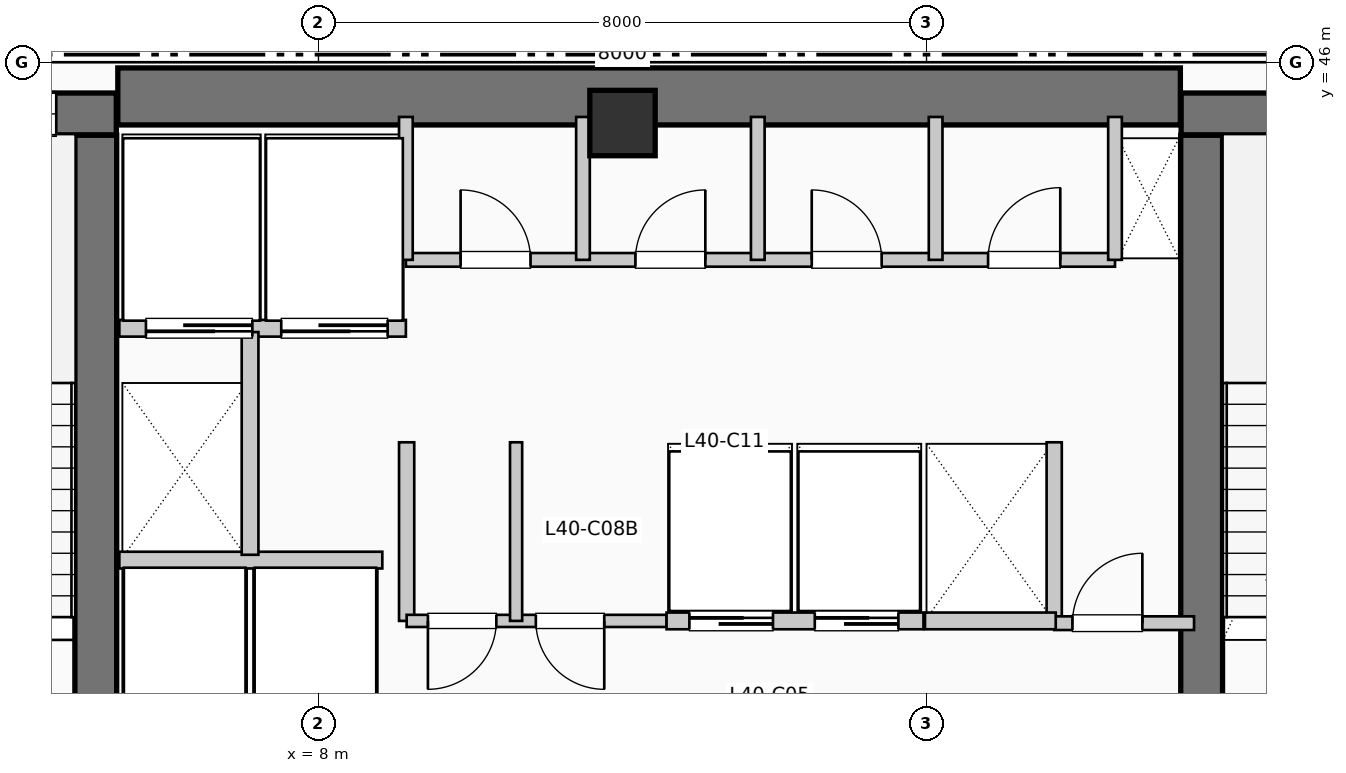
"""IFC4 building model, lengths in metres.
Left out: names, types, materials, properties, quantities, classifications, styles, units other than length and angle.
Written with IfcOpenShell. Run it as: python <this file> out.ifc"""

import sys

from ifc_helpers import new_model, si_unit, direction, frame, frame_2d, origin, origin_2d, place, context, subcontext, project, spatial, rectangle, extrude, element, fill, save


model = new_model("IFC4")
c1 = context("Model", 3, precision=1e-05, world=origin(), true_north=direction((0.0, 1.0)))
c2 = subcontext(c1, "Body", "Model", "MODEL_VIEW")
j1 = project(units=[si_unit("LENGTHUNIT", "METRE"), si_unit("PLANEANGLEUNIT", "RADIAN")], contexts=[c1])
p1 = place(None, origin())
s1 = spatial("IfcSite", under=j1, at=p1, CompositionType="ELEMENT")
p2 = place(p1, origin())
s2 = spatial("IfcBuilding", under=s1, at=p2, CompositionType="ELEMENT")
p3 = place(p2, frame((0.0, 0.0, 166.65)))
s3 = spatial("IfcBuildingStorey", under=s2, at=p3, CompositionType="ELEMENT", Elevation=166.65)
p4 = place(p3, frame((5.36, 45.55, 0.0), z_axis=(0.0, 0.0, 1.0), x_axis=(1.0, 0.0, 0.0)))
e1 = element("IfcWall", 1, at=p4, inside=s3, PredefinedType="SHEAR", context=c2, shape_type="SweptSolid", body=[
    extrude(rectangle(XDim=13.98, YDim=0.75, at=frame_2d((6.99, 0.0))), origin(), (0.0, 0.0, 1.0), 3.96),
])
p5 = place(p3, frame((5.07, 37.15, 0.0), z_axis=(0.0, 0.0, 1.0), x_axis=(0.0, 1.0, 0.0)))
e2 = element("IfcWall", 2, at=p5, inside=s3, PredefinedType="SHEAR", context=c2, shape_type="SweptSolid", body=[
    extrude(rectangle(XDim=7.89, YDim=0.55, at=frame_2d((3.945, 0.0))), origin(), (0.0, 0.0, 1.0), 3.96),
])
p6 = place(p3, frame((1.1, 45.32, 0.0), z_axis=(0.0, 0.0, 1.0), x_axis=(1.0, 0.0, 0.0)))
e3 = element("IfcWall", 3, at=p6, inside=s3, PredefinedType="SHEAR", context=c2, shape_type="SweptSolid", body=[
    extrude(rectangle(XDim=4.24, YDim=0.55, at=frame_2d((2.12, 0.0))), origin(), (0.0, 0.0, 1.0), 3.96),
])
p7 = place(p6, frame((2.05, 0.0, 1.05)))
e4 = element("IfcOpeningElement", 4, at=p7, cuts=e3, PredefinedType="OPENING", context=c2, shape_type="SweptSolid", body=[
    extrude(rectangle(XDim=1.4, YDim=1.8, at=frame_2d((0.7, 0.9))), frame((0.0, 0.285, 0.0), z_axis=(0.0, -1.0, 0.0), x_axis=(1.0, 0.0, 0.0)), (0.0, 0.0, 1.0), 0.57),
])
p8 = place(p3, frame((19.62, 37.15, 0.0), z_axis=(0.0, 0.0, 1.0), x_axis=(0.0, 1.0, 0.0)))
e5 = element("IfcWall", 5, at=p8, inside=s3, PredefinedType="SHEAR", context=c2, shape_type="SweptSolid", body=[
    extrude(rectangle(XDim=7.89, YDim=0.55, at=frame_2d((3.945, 0.0))), origin(), (0.0, 0.0, 1.0), 3.96),
])
p9 = place(p3, frame((19.35, 45.32, 0.0), z_axis=(0.0, 0.0, 1.0), x_axis=(1.0, 0.0, 0.0)))
e6 = element("IfcWall", 6, at=p9, inside=s3, PredefinedType="SHEAR", context=c2, shape_type="SweptSolid", body=[
    extrude(rectangle(XDim=3.69, YDim=0.55, at=frame_2d((1.845, 0.0))), origin(), (0.0, 0.0, 1.0), 3.96),
])
p10 = place(p9, frame((1.15, 0.0, 1.05)))
e7 = element("IfcOpeningElement", 7, at=p10, cuts=e6, PredefinedType="OPENING", context=c2, shape_type="SweptSolid", body=[
    extrude(rectangle(XDim=1.4, YDim=1.8, at=frame_2d((0.7, 0.9))), frame((0.0, 0.285, 0.0), z_axis=(0.0, -1.0, 0.0), x_axis=(1.0, 0.0, 0.0)), (0.0, 0.0, 1.0), 0.57),
])
p11 = place(p3, frame((12.0, 45.2, 0.0), z_axis=(0.0, 0.0, 1.0), x_axis=(1.0, 0.0, 0.0)))
e8 = element("IfcColumn", 8, at=p11, inside=s3, PredefinedType="COLUMN", context=c2, shape_type="SweptSolid", body=[
    extrude(rectangle(XDim=0.86, YDim=0.86, at=origin_2d()), origin(), (0.0, 0.0, 1.0), 3.96),
])
p12 = place(p3, frame((5.38, 39.45, 0.0), z_axis=(0.0, 0.0, 1.0), x_axis=(1.0, 0.0, 0.0)))
e9 = element("IfcWall", 9, at=p12, inside=s3, PredefinedType="PARTITIONING", context=c2, shape_type="SweptSolid", body=[
    extrude(rectangle(XDim=3.46, YDim=0.22, at=frame_2d((1.73, 0.0))), origin(), (0.0, 0.0, 1.0), 3.71),
])
p13 = place(p3, frame((5.38, 42.5, 0.0), z_axis=(0.0, 0.0, 1.0), x_axis=(1.0, 0.0, 0.0)))
e10 = element("IfcWall", 10, at=p13, inside=s3, PredefinedType="PARTITIONING", context=c2, shape_type="SweptSolid", body=[
    extrude(rectangle(XDim=3.77, YDim=0.22, at=frame_2d((1.885, 0.0))), origin(), (0.0, 0.0, 1.0), 3.71),
])
p14 = place(p13, frame((1.75, 0.0, 0.0), z_axis=(0.0, 0.0, 1.0), x_axis=(-1.0, 0.0, 0.0)))
e11 = element("IfcOpeningElement", 11, at=p14, cuts=e10, PredefinedType="OPENING", context=c2, shape_type="SweptSolid", body=[
    extrude(rectangle(XDim=1.4, YDim=2.2, at=frame_2d((0.7, 1.1))), frame((0.0, 0.12, 0.0), z_axis=(0.0, -1.0, 0.0), x_axis=(1.0, 0.0, 0.0)), (0.0, 0.0, 1.0), 0.24),
])
p15 = place(p13, frame((3.53, 0.0, 0.0), z_axis=(0.0, 0.0, 1.0), x_axis=(-1.0, 0.0, 0.0)))
e12 = element("IfcOpeningElement", 12, at=p15, cuts=e10, PredefinedType="OPENING", context=c2, shape_type="SweptSolid", body=[
    extrude(rectangle(XDim=1.4, YDim=2.2, at=frame_2d((0.7, 1.1))), frame((0.0, 0.12, 0.0), z_axis=(0.0, -1.0, 0.0), x_axis=(1.0, 0.0, 0.0)), (0.0, 0.0, 1.0), 0.24),
])
p16 = place(p3, frame((7.1, 39.52, 0.0), z_axis=(0.0, 0.0, 1.0), x_axis=(0.0, 1.0, 0.0)))
e13 = element("IfcWall", 13, at=p16, inside=s3, PredefinedType="PARTITIONING", context=c2, shape_type="SweptSolid", body=[
    extrude(rectangle(XDim=2.93, YDim=0.22, at=frame_2d((1.465, 0.0))), origin(), (0.0, 0.0, 1.0), 3.71),
])
for number, where, z_axis, x_axis in (
    (14, (9.16, 38.65, 0.0), (0.0, 0.0, 1.0), (0.0, 1.0, 0.0)),
    (15, (17.68, 38.65, 0.0), (0.0, 0.0, 1.0), (0.0, 1.0, 0.0)),
):
    element("IfcWall", number, at=place(p3, frame(where, z_axis=z_axis, x_axis=x_axis)), inside=s3, PredefinedType="PARTITIONING", context=c2, shape_type="SweptSolid", body=[
        extrude(rectangle(XDim=2.35, YDim=0.2, at=frame_2d((1.175, 0.0))), origin(), (0.0, 0.0, 1.0), 3.71),
    ])
p17 = place(p3, frame((17.68, 38.62, 0.0), z_axis=(0.0, 0.0, 1.0), x_axis=(1.0, 0.0, 0.0)))
e16 = element("IfcWall", 16, at=p17, inside=s3, PredefinedType="PARTITIONING", context=c2, shape_type="SweptSolid", body=[
    extrude(rectangle(XDim=1.84, YDim=0.18, at=frame_2d((0.92, 0.0))), origin(), (0.0, 0.0, 1.0), 3.71),
])
p18 = place(p17, frame((0.24, 0.0, 0.0)))
e17 = element("IfcOpeningElement", 17, at=p18, cuts=e16, PredefinedType="OPENING", context=c2, shape_type="SweptSolid", body=[
    extrude(rectangle(XDim=0.92, YDim=2.1, at=frame_2d((0.46, 1.05))), frame((0.0, 0.1, 0.0), z_axis=(0.0, -1.0, 0.0), x_axis=(1.0, 0.0, 0.0)), (0.0, 0.0, 1.0), 0.2),
])
p19 = place(p3, frame((9.16, 38.65, 0.0), z_axis=(0.0, 0.0, 1.0), x_axis=(1.0, 0.0, 0.0)))
e18 = element("IfcWall", 18, at=p19, inside=s3, PredefinedType="PARTITIONING", context=c2, shape_type="SweptSolid", body=[
    extrude(rectangle(XDim=3.42, YDim=0.16, at=frame_2d((1.71, 0.0))), origin(), (0.0, 0.0, 1.0), 3.71),
])
p20 = place(p19, frame((1.18, 0.0, 0.0), z_axis=(0.0, 0.0, 1.0), x_axis=(-1.0, 0.0, 0.0)))
e19 = element("IfcOpeningElement", 19, at=p20, cuts=e18, PredefinedType="OPENING", context=c2, shape_type="SweptSolid", body=[
    extrude(rectangle(XDim=0.9, YDim=2.15, at=frame_2d((0.45, 1.075))), frame((0.0, 0.09, 0.0), z_axis=(0.0, -1.0, 0.0), x_axis=(1.0, 0.0, 0.0)), (0.0, 0.0, 1.0), 0.18),
])
p21 = place(p19, frame((2.6, 0.0, 0.0), z_axis=(0.0, 0.0, 1.0), x_axis=(-1.0, 0.0, 0.0)))
e20 = element("IfcOpeningElement", 20, at=p21, cuts=e18, PredefinedType="OPENING", context=c2, shape_type="SweptSolid", body=[
    extrude(rectangle(XDim=0.9, YDim=2.15, at=frame_2d((0.45, 1.075))), frame((0.0, 0.09, 0.0), z_axis=(0.0, -1.0, 0.0), x_axis=(1.0, 0.0, 0.0)), (0.0, 0.0, 1.0), 0.18),
])
p22 = place(p3, frame((10.6, 38.65, 0.0), z_axis=(0.0, 0.0, 1.0), x_axis=(0.0, 1.0, 0.0)))
e21 = element("IfcWall", 21, at=p22, inside=s3, PredefinedType="PARTITIONING", context=c2, shape_type="SweptSolid", body=[
    extrude(rectangle(XDim=2.35, YDim=0.16, at=frame_2d((1.175, 0.0))), origin(), (0.0, 0.0, 1.0), 3.71),
])
p23 = place(p3, frame((12.58, 38.65, 0.0), z_axis=(0.0, 0.0, 1.0), x_axis=(1.0, 0.0, 0.0)))
e22 = element("IfcWall", 22, at=p23, inside=s3, PredefinedType="PARTITIONING", context=c2, shape_type="SweptSolid", body=[
    extrude(rectangle(XDim=3.38, YDim=0.22, at=frame_2d((1.69, 0.0))), origin(), (0.0, 0.0, 1.0), 3.71),
])
p24 = place(p23, frame((0.3, 0.0, 0.0)))
e23 = element("IfcOpeningElement", 23, at=p24, cuts=e22, PredefinedType="OPENING", context=c2, shape_type="SweptSolid", body=[
    extrude(rectangle(XDim=1.1, YDim=2.2, at=frame_2d((0.55, 1.1))), frame((0.0, 0.12, 0.0), z_axis=(0.0, -1.0, 0.0), x_axis=(1.0, 0.0, 0.0)), (0.0, 0.0, 1.0), 0.24),
])
p25 = place(p23, frame((1.95, 0.0, 0.0)))
e24 = element("IfcOpeningElement", 24, at=p25, cuts=e22, PredefinedType="OPENING", context=c2, shape_type="SweptSolid", body=[
    extrude(rectangle(XDim=1.1, YDim=2.2, at=frame_2d((0.55, 1.1))), frame((0.0, 0.12, 0.0), z_axis=(0.0, -1.0, 0.0), x_axis=(1.0, 0.0, 0.0)), (0.0, 0.0, 1.0), 0.24),
])
p26 = place(p3, frame((15.98, 38.65, 0.0), z_axis=(0.0, 0.0, 1.0), x_axis=(1.0, 0.0, 0.0)))
e25 = element("IfcWall", 25, at=p26, inside=s3, PredefinedType="PARTITIONING", context=c2, shape_type="SweptSolid", body=[
    extrude(rectangle(XDim=1.72, YDim=0.22, at=frame_2d((0.86, 0.0))), origin(), (0.0, 0.0, 1.0), 3.71),
])
p27 = place(p3, frame((9.15, 43.4, 0.0), z_axis=(0.0, 0.0, 1.0), x_axis=(1.0, 0.0, 0.0)))
e26 = element("IfcWall", 26, at=p27, inside=s3, PredefinedType="PLUMBINGWALL", context=c2, shape_type="SweptSolid", body=[
    extrude(rectangle(XDim=9.33, YDim=0.18, at=frame_2d((4.665, 0.0))), origin(), (0.0, 0.0, 1.0), 3.71),
])
p28 = place(p27, frame((0.72, 0.0, 0.0)))
e27 = element("IfcOpeningElement", 27, at=p28, cuts=e26, PredefinedType="OPENING", context=c2, shape_type="SweptSolid", body=[
    extrude(rectangle(XDim=0.92, YDim=2.1, at=frame_2d((0.46, 1.05))), frame((0.0, 0.1, 0.0), z_axis=(0.0, -1.0, 0.0), x_axis=(1.0, 0.0, 0.0)), (0.0, 0.0, 1.0), 0.2),
])
p29 = place(p27, frame((3.02, 0.0, 0.0)))
e28 = element("IfcOpeningElement", 28, at=p29, cuts=e26, PredefinedType="OPENING", context=c2, shape_type="SweptSolid", body=[
    extrude(rectangle(XDim=0.92, YDim=2.1, at=frame_2d((0.46, 1.05))), frame((0.0, 0.1, 0.0), z_axis=(0.0, -1.0, 0.0), x_axis=(1.0, 0.0, 0.0)), (0.0, 0.0, 1.0), 0.2),
])
p30 = place(p27, frame((5.34, 0.0, 0.0)))
e29 = element("IfcOpeningElement", 29, at=p30, cuts=e26, PredefinedType="OPENING", context=c2, shape_type="SweptSolid", body=[
    extrude(rectangle(XDim=0.92, YDim=2.1, at=frame_2d((0.46, 1.05))), frame((0.0, 0.1, 0.0), z_axis=(0.0, -1.0, 0.0), x_axis=(1.0, 0.0, 0.0)), (0.0, 0.0, 1.0), 0.2),
])
p31 = place(p27, frame((7.66, 0.0, 0.0)))
e30 = element("IfcOpeningElement", 30, at=p31, cuts=e26, PredefinedType="OPENING", context=c2, shape_type="SweptSolid", body=[
    extrude(rectangle(XDim=0.95, YDim=2.1, at=frame_2d((0.475, 1.05))), frame((0.0, 0.1, 0.0), z_axis=(0.0, -1.0, 0.0), x_axis=(1.0, 0.0, 0.0)), (0.0, 0.0, 1.0), 0.2),
])
for number, where, z_axis, x_axis in (
    (31, (9.15, 43.4, 0.0), (0.0, 0.0, 1.0), (0.0, 1.0, 0.0)),
    (32, (18.48, 43.4, 0.0), (0.0, 0.0, 1.0), (0.0, 1.0, 0.0)),
    (33, (11.48, 43.4, 0.0), (0.0, 0.0, 1.0), (0.0, 1.0, 0.0)),
    (34, (13.78, 43.4, 0.0), (0.0, 0.0, 1.0), (0.0, 1.0, 0.0)),
    (35, (16.12, 43.4, 0.0), (0.0, 0.0, 1.0), (0.0, 1.0, 0.0)),
):
    element("IfcWall", number, at=place(p3, frame(where, z_axis=z_axis, x_axis=x_axis)), inside=s3, PredefinedType="PLUMBINGWALL", context=c2, shape_type="SweptSolid", body=[
        extrude(rectangle(XDim=1.88, YDim=0.18, at=frame_2d((0.94, 0.0))), origin(), (0.0, 0.0, 1.0), 3.71),
    ])
p32 = place(p7, origin())
e36 = element("IfcWindow", 36, at=p32, inside=s3, PartitioningType="SINGLE_PANEL", PredefinedType="WINDOW", context=c2, shape_type="SweptSolid", body=[
    extrude(rectangle(XDim=1.4, YDim=1.8, at=frame_2d((0.7, 0.9))), frame((0.0, 0.03, 0.0), z_axis=(0.0, -1.0, 0.0), x_axis=(1.0, 0.0, 0.0)), (0.0, 0.0, 1.0), 0.06),
])
fill(e4, e36)
p33 = place(p14, origin())
e37 = element("IfcDoor", 37, at=p33, inside=s3, OperationType="SLIDING_TO_LEFT", PredefinedType="DOOR", context=c2, shape_type="SweptSolid", body=[
    extrude(rectangle(XDim=1.4, YDim=2.2, at=frame_2d((0.7, 1.1))), frame((0.0, 0.025, 0.0), z_axis=(0.0, -1.0, 0.0), x_axis=(1.0, 0.0, 0.0)), (0.0, 0.0, 1.0), 0.05),
])
fill(e11, e37)
p34 = place(p15, origin())
e38 = element("IfcDoor", 38, at=p34, inside=s3, OperationType="SLIDING_TO_LEFT", PredefinedType="DOOR", context=c2, shape_type="SweptSolid", body=[
    extrude(rectangle(XDim=1.4, YDim=2.2, at=frame_2d((0.7, 1.1))), frame((0.0, 0.025, 0.0), z_axis=(0.0, -1.0, 0.0), x_axis=(1.0, 0.0, 0.0)), (0.0, 0.0, 1.0), 0.05),
])
fill(e12, e38)
p35 = place(p18, origin())
e39 = element("IfcDoor", 39, at=p35, inside=s3, OperationType="SINGLE_SWING_RIGHT", PredefinedType="DOOR", context=c2, shape_type="SweptSolid", body=[
    extrude(rectangle(XDim=0.92, YDim=2.1, at=frame_2d((0.46, 1.05))), frame((0.0, 0.025, 0.0), z_axis=(0.0, -1.0, 0.0), x_axis=(1.0, 0.0, 0.0)), (0.0, 0.0, 1.0), 0.05),
])
fill(e17, e39)
p36 = place(p20, origin())
e40 = element("IfcDoor", 40, at=p36, inside=s3, OperationType="SINGLE_SWING_LEFT", PredefinedType="DOOR", context=c2, shape_type="SweptSolid", body=[
    extrude(rectangle(XDim=0.9, YDim=2.15, at=frame_2d((0.45, 1.075))), frame((0.0, 0.025, 0.0), z_axis=(0.0, -1.0, 0.0), x_axis=(1.0, 0.0, 0.0)), (0.0, 0.0, 1.0), 0.05),
])
fill(e19, e40)
p37 = place(p21, origin())
e41 = element("IfcDoor", 41, at=p37, inside=s3, OperationType="SINGLE_SWING_RIGHT", PredefinedType="DOOR", context=c2, shape_type="SweptSolid", body=[
    extrude(rectangle(XDim=0.9, YDim=2.15, at=frame_2d((0.45, 1.075))), frame((0.0, 0.025, 0.0), z_axis=(0.0, -1.0, 0.0), x_axis=(1.0, 0.0, 0.0)), (0.0, 0.0, 1.0), 0.05),
])
fill(e20, e41)
p38 = place(p24, origin())
e42 = element("IfcDoor", 42, at=p38, inside=s3, OperationType="SLIDING_TO_RIGHT", PredefinedType="DOOR", context=c2, shape_type="SweptSolid", body=[
    extrude(rectangle(XDim=1.1, YDim=2.2, at=frame_2d((0.55, 1.1))), frame((0.0, 0.025, 0.0), z_axis=(0.0, -1.0, 0.0), x_axis=(1.0, 0.0, 0.0)), (0.0, 0.0, 1.0), 0.05),
])
fill(e23, e42)
p39 = place(p25, origin())
e43 = element("IfcDoor", 43, at=p39, inside=s3, OperationType="SLIDING_TO_RIGHT", PredefinedType="DOOR", context=c2, shape_type="SweptSolid", body=[
    extrude(rectangle(XDim=1.1, YDim=2.2, at=frame_2d((0.55, 1.1))), frame((0.0, 0.025, 0.0), z_axis=(0.0, -1.0, 0.0), x_axis=(1.0, 0.0, 0.0)), (0.0, 0.0, 1.0), 0.05),
])
fill(e24, e43)
p40 = place(p28, origin())
e44 = element("IfcDoor", 44, at=p40, inside=s3, OperationType="SINGLE_SWING_LEFT", PredefinedType="DOOR", context=c2, shape_type="SweptSolid", body=[
    extrude(rectangle(XDim=0.92, YDim=2.1, at=frame_2d((0.46, 1.05))), frame((0.0, 0.025, 0.0), z_axis=(0.0, -1.0, 0.0), x_axis=(1.0, 0.0, 0.0)), (0.0, 0.0, 1.0), 0.05),
])
fill(e27, e44)
p41 = place(p29, origin())
e45 = element("IfcDoor", 45, at=p41, inside=s3, OperationType="SINGLE_SWING_RIGHT", PredefinedType="DOOR", context=c2, shape_type="SweptSolid", body=[
    extrude(rectangle(XDim=0.92, YDim=2.1, at=frame_2d((0.46, 1.05))), frame((0.0, 0.025, 0.0), z_axis=(0.0, -1.0, 0.0), x_axis=(1.0, 0.0, 0.0)), (0.0, 0.0, 1.0), 0.05),
])
fill(e28, e45)
p42 = place(p30, origin())
e46 = element("IfcDoor", 46, at=p42, inside=s3, OperationType="SINGLE_SWING_LEFT", PredefinedType="DOOR", context=c2, shape_type="SweptSolid", body=[
    extrude(rectangle(XDim=0.92, YDim=2.1, at=frame_2d((0.46, 1.05))), frame((0.0, 0.025, 0.0), z_axis=(0.0, -1.0, 0.0), x_axis=(1.0, 0.0, 0.0)), (0.0, 0.0, 1.0), 0.05),
])
fill(e29, e46)
p43 = place(p31, origin())
e47 = element("IfcDoor", 47, at=p43, inside=s3, OperationType="SINGLE_SWING_RIGHT", PredefinedType="DOOR", context=c2, shape_type="SweptSolid", body=[
    extrude(rectangle(XDim=0.95, YDim=2.1, at=frame_2d((0.475, 1.05))), frame((0.0, 0.025, 0.0), z_axis=(0.0, -1.0, 0.0), x_axis=(1.0, 0.0, 0.0)), (0.0, 0.0, 1.0), 0.05),
])
fill(e30, e47)
save(model, sys.argv[1])
